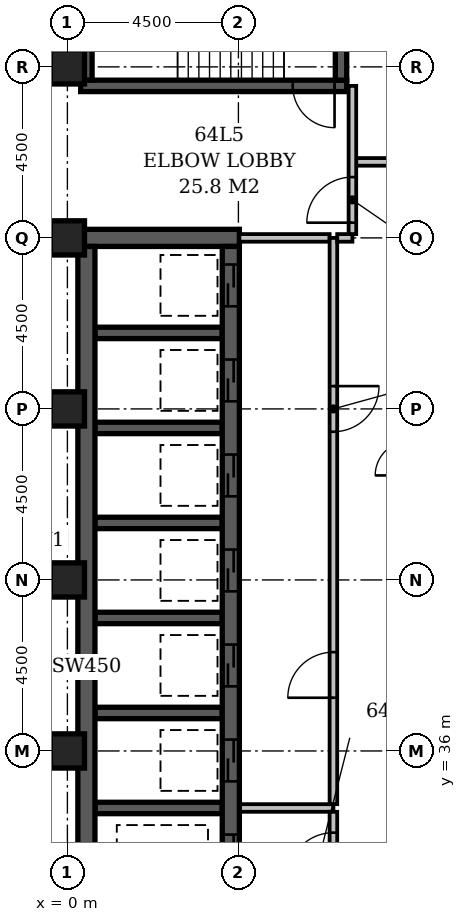
"""IFC4 building model, lengths in metres.
Left out: names, types, materials, properties, quantities, classifications, styles, units other than length and angle.
Written with IfcOpenShell. Run it as: python <this file> out.ifc"""

import sys

from ifc_helpers import new_model, si_unit, direction, frame, frame_2d, origin, origin_2d, place, context, subcontext, project, spatial, rectangle, extrude, element, fill, save


model = new_model("IFC4")
c1 = context("Model", 3, precision=1e-05, world=origin(), true_north=direction((0.0, 1.0)))
c2 = subcontext(c1, "Body", "Model", "MODEL_VIEW")
j1 = project(units=[si_unit("LENGTHUNIT", "METRE"), si_unit("PLANEANGLEUNIT", "RADIAN")], contexts=[c1])
p1 = place(None, origin())
s1 = spatial("IfcSite", under=j1, at=p1, CompositionType="ELEMENT")
p2 = place(p1, origin())
s2 = spatial("IfcBuilding", under=s1, at=p2, CompositionType="ELEMENT")
p3 = place(p2, frame((0.0, 0.0, 247.4)))
s3 = spatial("IfcBuildingStorey", under=s2, at=p3, CompositionType="ELEMENT", Elevation=247.4)
p4 = place(p3, frame((0.275, 49.5, -0.3), z_axis=(0.0, 0.0, 1.0), x_axis=(1.0, 0.0, 0.0)))
e1 = element("IfcWall", 1, at=p4, inside=s3, PredefinedType="SHEAR", context=c2, shape_type="SweptSolid", body=[
    extrude(rectangle(XDim=4.25, YDim=0.45, at=frame_2d((2.125, 0.0))), origin(), (0.0, 0.0, 1.0), 3.6),
])
p5 = place(p3, frame((0.35, 53.5, -0.3), z_axis=(0.0, 0.0, 1.0), x_axis=(1.0, 0.0, 0.0)))
e2 = element("IfcWall", 2, at=p5, inside=s3, PredefinedType="SHEAR", context=c2, shape_type="SweptSolid", body=[
    extrude(rectangle(XDim=7.0, YDim=0.3, at=frame_2d((3.5, 0.0))), origin(), (0.0, 0.0, 1.0), 3.6),
])
p6 = place(p5, frame((5.58, 0.0, 0.3)))
e3 = element("IfcOpeningElement", 3, at=p6, cuts=e2, PredefinedType="OPENING", context=c2, shape_type="SweptSolid", body=[
    extrude(rectangle(XDim=1.1, YDim=2.1, at=frame_2d((0.55, 1.05))), frame((0.0, 0.162, 0.0), z_axis=(0.0, -1.0, 0.0), x_axis=(1.0, 0.0, 0.0)), (0.0, 0.0, 1.0), 0.324),
])
p7 = place(p3, frame((0.5, 27.15, -0.3), z_axis=(0.0, 0.0, 1.0), x_axis=(0.0, 1.0, 0.0)))
e4 = element("IfcWall", 4, at=p7, inside=s3, PredefinedType="SHEAR", context=c2, shape_type="SweptSolid", body=[
    extrude(rectangle(XDim=22.125, YDim=0.45, at=frame_2d((11.062, 0.0))), origin(), (0.0, 0.0, 1.0), 3.6),
])
p8 = place(p3, frame((0.5, 53.65, -0.3), z_axis=(0.0, 0.0, 1.0), x_axis=(0.0, 1.0, 0.0)))
e5 = element("IfcWall", 5, at=p8, inside=s3, PredefinedType="SHEAR", context=c2, shape_type="SweptSolid", body=[
    extrude(rectangle(XDim=4.2, YDim=0.3, at=frame_2d((2.1, 0.0))), origin(), (0.0, 0.0, 1.0), 3.6),
])
for number, where, z_axis, x_axis in (
    (6, (0.725, 34.5, -0.3), (0.0, 0.0, 1.0), (1.0, 0.0, 0.0)),
    (7, (0.725, 37.0, -0.3), (0.0, 0.0, 1.0), (1.0, 0.0, 0.0)),
    (8, (0.725, 39.5, -0.3), (0.0, 0.0, 1.0), (1.0, 0.0, 0.0)),
    (9, (0.725, 42.0, -0.3), (0.0, 0.0, 1.0), (1.0, 0.0, 0.0)),
    (10, (0.725, 44.5, -0.3), (0.0, 0.0, 1.0), (1.0, 0.0, 0.0)),
    (11, (0.725, 47.0, -0.3), (0.0, 0.0, 1.0), (1.0, 0.0, 0.0)),
):
    element("IfcWall", number, at=place(p3, frame(where, z_axis=z_axis, x_axis=x_axis)), inside=s3, PredefinedType="SHEAR", context=c2, shape_type="SweptSolid", body=[
        extrude(rectangle(XDim=3.35, YDim=0.3, at=frame_2d((1.675, 0.0))), origin(), (0.0, 0.0, 1.0), 3.6),
    ])
p9 = place(p3, frame((4.3, 27.15, -0.3), z_axis=(0.0, 0.0, 1.0), x_axis=(0.0, 1.0, 0.0)))
e12 = element("IfcWall", 12, at=p9, inside=s3, PredefinedType="SHEAR", context=c2, shape_type="SweptSolid", body=[
    extrude(rectangle(XDim=22.125, YDim=0.45, at=frame_2d((11.062, 0.0))), origin(), (0.0, 0.0, 1.0), 3.6),
])
p10 = place(p9, frame((3.05, 0.0, 0.3)))
e13 = element("IfcOpeningElement", 13, at=p10, cuts=e12, PredefinedType="OPENING", context=c2, shape_type="SweptSolid", body=[
    extrude(rectangle(XDim=1.1, YDim=2.1, at=frame_2d((0.55, 1.05))), frame((0.0, 0.237, 0.0), z_axis=(0.0, -1.0, 0.0), x_axis=(1.0, 0.0, 0.0)), (0.0, 0.0, 1.0), 0.474),
])
p11 = place(p9, frame((0.55, 0.0, 0.3)))
e14 = element("IfcOpeningElement", 14, at=p11, cuts=e12, PredefinedType="OPENING", context=c2, shape_type="SweptSolid", body=[
    extrude(rectangle(XDim=1.1, YDim=2.1, at=frame_2d((0.55, 1.05))), frame((0.0, 0.237, 0.0), z_axis=(0.0, -1.0, 0.0), x_axis=(1.0, 0.0, 0.0)), (0.0, 0.0, 1.0), 0.474),
])
p12 = place(p9, frame((20.55, 0.0, 0.3)))
e15 = element("IfcOpeningElement", 15, at=p12, cuts=e12, PredefinedType="OPENING", context=c2, shape_type="SweptSolid", body=[
    extrude(rectangle(XDim=1.1, YDim=2.1, at=frame_2d((0.55, 1.05))), frame((0.0, 0.237, 0.0), z_axis=(0.0, -1.0, 0.0), x_axis=(1.0, 0.0, 0.0)), (0.0, 0.0, 1.0), 0.474),
])
p13 = place(p9, frame((18.05, 0.0, 0.3)))
e16 = element("IfcOpeningElement", 16, at=p13, cuts=e12, PredefinedType="OPENING", context=c2, shape_type="SweptSolid", body=[
    extrude(rectangle(XDim=1.1, YDim=2.1, at=frame_2d((0.55, 1.05))), frame((0.0, 0.237, 0.0), z_axis=(0.0, -1.0, 0.0), x_axis=(1.0, 0.0, 0.0)), (0.0, 0.0, 1.0), 0.474),
])
p14 = place(p9, frame((15.55, 0.0, 0.3)))
e17 = element("IfcOpeningElement", 17, at=p14, cuts=e12, PredefinedType="OPENING", context=c2, shape_type="SweptSolid", body=[
    extrude(rectangle(XDim=1.1, YDim=2.1, at=frame_2d((0.55, 1.05))), frame((0.0, 0.237, 0.0), z_axis=(0.0, -1.0, 0.0), x_axis=(1.0, 0.0, 0.0)), (0.0, 0.0, 1.0), 0.474),
])
p15 = place(p9, frame((13.05, 0.0, 0.3)))
e18 = element("IfcOpeningElement", 18, at=p15, cuts=e12, PredefinedType="OPENING", context=c2, shape_type="SweptSolid", body=[
    extrude(rectangle(XDim=1.1, YDim=2.1, at=frame_2d((0.55, 1.05))), frame((0.0, 0.237, 0.0), z_axis=(0.0, -1.0, 0.0), x_axis=(1.0, 0.0, 0.0)), (0.0, 0.0, 1.0), 0.474),
])
p16 = place(p9, frame((10.55, 0.0, 0.3)))
e19 = element("IfcOpeningElement", 19, at=p16, cuts=e12, PredefinedType="OPENING", context=c2, shape_type="SweptSolid", body=[
    extrude(rectangle(XDim=1.1, YDim=2.1, at=frame_2d((0.55, 1.05))), frame((0.0, 0.237, 0.0), z_axis=(0.0, -1.0, 0.0), x_axis=(1.0, 0.0, 0.0)), (0.0, 0.0, 1.0), 0.474),
])
p17 = place(p9, frame((8.05, 0.0, 0.3)))
e20 = element("IfcOpeningElement", 20, at=p17, cuts=e12, PredefinedType="OPENING", context=c2, shape_type="SweptSolid", body=[
    extrude(rectangle(XDim=1.1, YDim=2.1, at=frame_2d((0.55, 1.05))), frame((0.0, 0.237, 0.0), z_axis=(0.0, -1.0, 0.0), x_axis=(1.0, 0.0, 0.0)), (0.0, 0.0, 1.0), 0.474),
])
p18 = place(p9, frame((5.55, 0.0, 0.3)))
e21 = element("IfcOpeningElement", 21, at=p18, cuts=e12, PredefinedType="OPENING", context=c2, shape_type="SweptSolid", body=[
    extrude(rectangle(XDim=1.1, YDim=2.1, at=frame_2d((0.55, 1.05))), frame((0.0, 0.237, 0.0), z_axis=(0.0, -1.0, 0.0), x_axis=(1.0, 0.0, 0.0)), (0.0, 0.0, 1.0), 0.474),
])
p19 = place(p3, frame((7.2, 53.65, -0.3), z_axis=(0.0, 0.0, 1.0), x_axis=(0.0, 1.0, 0.0)))
e22 = element("IfcWall", 22, at=p19, inside=s3, PredefinedType="SHEAR", context=c2, shape_type="SweptSolid", body=[
    extrude(rectangle(XDim=4.2, YDim=0.3, at=frame_2d((2.1, 0.0))), origin(), (0.0, 0.0, 1.0), 3.6),
])
for number, where, z_axis, x_axis in (
    (23, (0.0, 36.0, -0.3), (0.0, 0.0, 1.0), (1.0, 0.0, 0.0)),
    (24, (0.0, 40.5, -0.3), (0.0, 0.0, 1.0), (1.0, 0.0, 0.0)),
    (25, (0.0, 45.0, -0.3), (0.0, 0.0, 1.0), (1.0, 0.0, 0.0)),
    (26, (0.0, 49.5, -0.3), (0.0, 0.0, 1.0), (1.0, 0.0, 0.0)),
    (27, (0.0, 54.0, -0.3), (0.0, 0.0, 1.0), (1.0, 0.0, 0.0)),
):
    element("IfcColumn", number, at=place(p3, frame(where, z_axis=z_axis, x_axis=x_axis)), inside=s3, PredefinedType="COLUMN", context=c2, shape_type="SweptSolid", body=[
        extrude(rectangle(XDim=0.9, YDim=0.9, at=origin_2d()), origin(), (0.0, 0.0, 1.0), 3.6),
    ])
p20 = place(p3, frame((4.545, 34.5, 0.0), z_axis=(0.0, 0.0, 1.0), x_axis=(1.0, 0.0, 0.0)))
e28 = element("IfcWall", 28, at=p20, inside=s3, PredefinedType="PARTITIONING", context=c2, shape_type="SweptSolid", body=[
    extrude(rectangle(XDim=2.455, YDim=0.2, at=frame_2d((1.228, 0.0))), origin(), (0.0, 0.0, 1.0), 3.3),
])
p21 = place(p3, frame((7.0, 34.6, 0.0), z_axis=(0.0, 0.0, 1.0), x_axis=(0.0, 1.0, 0.0)))
e29 = element("IfcWall", 29, at=p21, inside=s3, PredefinedType="PARTITIONING", context=c2, shape_type="SweptSolid", body=[
    extrude(rectangle(XDim=14.9, YDim=0.2, at=frame_2d((7.45, 0.0))), origin(), (0.0, 0.0, 1.0), 3.3),
])
p22 = place(p21, frame((2.8, 0.0, 0.0)))
e30 = element("IfcOpeningElement", 30, at=p22, cuts=e29, PredefinedType="OPENING", context=c2, shape_type="SweptSolid", body=[
    extrude(rectangle(XDim=1.2, YDim=2.1, at=frame_2d((0.6, 1.05))), frame((0.0, 0.112, 0.0), z_axis=(0.0, -1.0, 0.0), x_axis=(1.0, 0.0, 0.0)), (0.0, 0.0, 1.0), 0.224),
])
p23 = place(p21, frame((9.8, 0.0, 0.0)))
e31 = element("IfcOpeningElement", 31, at=p23, cuts=e29, PredefinedType="OPENING", context=c2, shape_type="SweptSolid", body=[
    extrude(rectangle(XDim=1.2, YDim=2.1, at=frame_2d((0.6, 1.05))), frame((0.0, 0.112, 0.0), z_axis=(0.0, -1.0, 0.0), x_axis=(1.0, 0.0, 0.0)), (0.0, 0.0, 1.0), 0.224),
])
p24 = place(p3, frame((4.525, 49.5, 0.0), z_axis=(0.0, 0.0, 1.0), x_axis=(1.0, 0.0, 0.0)))
e32 = element("IfcWall", 32, at=p24, inside=s3, PredefinedType="PARTITIONING", context=c2, shape_type="SweptSolid", body=[
    extrude(rectangle(XDim=2.375, YDim=0.2, at=frame_2d((1.188, 0.0))), origin(), (0.0, 0.0, 1.0), 3.3),
])
p25 = place(p3, frame((7.0, 32.1, 0.0), z_axis=(0.0, 0.0, 1.0), x_axis=(0.0, 1.0, 0.0)))
e33 = element("IfcWall", 33, at=p25, inside=s3, PredefinedType="PARTITIONING", context=c2, shape_type="SweptSolid", body=[
    extrude(rectangle(XDim=2.3, YDim=0.2, at=frame_2d((1.15, 0.0))), origin(), (0.0, 0.0, 1.0), 3.3),
])
p26 = place(p25, frame((0.55, 0.0, 0.0)))
e34 = element("IfcOpeningElement", 34, at=p26, cuts=e33, PredefinedType="OPENING", context=c2, shape_type="SweptSolid", body=[
    extrude(rectangle(XDim=1.2, YDim=2.1, at=frame_2d((0.6, 1.05))), frame((0.0, 0.112, 0.0), z_axis=(0.0, -1.0, 0.0), x_axis=(1.0, 0.0, 0.0)), (0.0, 0.0, 1.0), 0.224),
])
p27 = place(p3, frame((7.1, 49.5, 0.0), z_axis=(0.0, 0.0, 1.0), x_axis=(1.0, 0.0, 0.0)))
e35 = element("IfcWall", 35, at=p27, inside=s3, PredefinedType="PARTITIONING", context=c2, shape_type="SweptSolid", body=[
    extrude(rectangle(XDim=0.4, YDim=0.2, at=frame_2d((0.2, 0.0))), origin(), (0.0, 0.0, 1.0), 3.3),
])
p28 = place(p3, frame((7.5, 49.6, 0.0), z_axis=(0.0, 0.0, 1.0), x_axis=(0.0, 1.0, 0.0)))
e36 = element("IfcWall", 36, at=p28, inside=s3, PredefinedType="PARTITIONING", context=c2, shape_type="SweptSolid", body=[
    extrude(rectangle(XDim=3.9, YDim=0.2, at=frame_2d((1.95, 0.0))), origin(), (0.0, 0.0, 1.0), 3.3),
])
p29 = place(p28, frame((0.3, 0.0, 0.0)))
e37 = element("IfcOpeningElement", 37, at=p29, cuts=e36, PredefinedType="OPENING", context=c2, shape_type="SweptSolid", body=[
    extrude(rectangle(XDim=1.2, YDim=2.1, at=frame_2d((0.6, 1.05))), frame((0.0, 0.112, 0.0), z_axis=(0.0, -1.0, 0.0), x_axis=(1.0, 0.0, 0.0)), (0.0, 0.0, 1.0), 0.224),
])
p30 = place(p3, frame((7.6, 51.5, 0.0), z_axis=(0.0, 0.0, 1.0), x_axis=(1.0, 0.0, 0.0)))
e38 = element("IfcWall", 38, at=p30, inside=s3, PredefinedType="PARTITIONING", context=c2, shape_type="SweptSolid", body=[
    extrude(rectangle(XDim=14.65, YDim=0.2, at=frame_2d((7.325, 0.0))), origin(), (0.0, 0.0, 1.0), 3.3),
])
p31 = place(p30, frame((3.4, 0.0, 0.0)))
e39 = element("IfcOpeningElement", 39, at=p31, cuts=e38, PredefinedType="OPENING", context=c2, shape_type="SweptSolid", body=[
    extrude(rectangle(XDim=1.2, YDim=2.1, at=frame_2d((0.6, 1.05))), frame((0.0, 0.112, 0.0), z_axis=(0.0, -1.0, 0.0), x_axis=(1.0, 0.0, 0.0)), (0.0, 0.0, 1.0), 0.224),
])
p32 = place(p30, frame((10.925, 0.0, 0.0)))
e40 = element("IfcOpeningElement", 40, at=p32, cuts=e38, PredefinedType="OPENING", context=c2, shape_type="SweptSolid", body=[
    extrude(rectangle(XDim=1.0, YDim=2.1, at=frame_2d((0.5, 1.05))), frame((0.0, 0.112, 0.0), z_axis=(0.0, -1.0, 0.0), x_axis=(1.0, 0.0, 0.0)), (0.0, 0.0, 1.0), 0.224),
])
p33 = place(p29, origin())
e41 = element("IfcDoor", 41, at=p33, inside=s3, OperationType="SINGLE_SWING_LEFT", PredefinedType="DOOR", context=c2, shape_type="SweptSolid", body=[
    extrude(rectangle(XDim=1.2, YDim=2.1, at=frame_2d((0.6, 1.05))), frame((0.0, 0.025, 0.0), z_axis=(0.0, -1.0, 0.0), x_axis=(1.0, 0.0, 0.0)), (0.0, 0.0, 1.0), 0.05),
])
fill(e37, e41)
p34 = place(p12, origin())
e42 = element("IfcDoor", 42, at=p34, inside=s3, OperationType="SLIDING_TO_LEFT", PredefinedType="DOOR", context=c2, shape_type="SweptSolid", body=[
    extrude(rectangle(XDim=1.1, YDim=2.1, at=frame_2d((0.55, 1.05))), frame((0.0, 0.025, 0.0), z_axis=(0.0, -1.0, 0.0), x_axis=(1.0, 0.0, 0.0)), (0.0, 0.0, 1.0), 0.05),
])
fill(e15, e42)
p35 = place(p13, origin())
e43 = element("IfcDoor", 43, at=p35, inside=s3, OperationType="SLIDING_TO_LEFT", PredefinedType="DOOR", context=c2, shape_type="SweptSolid", body=[
    extrude(rectangle(XDim=1.1, YDim=2.1, at=frame_2d((0.55, 1.05))), frame((0.0, 0.025, 0.0), z_axis=(0.0, -1.0, 0.0), x_axis=(1.0, 0.0, 0.0)), (0.0, 0.0, 1.0), 0.05),
])
fill(e16, e43)
p36 = place(p14, origin())
e44 = element("IfcDoor", 44, at=p36, inside=s3, OperationType="SLIDING_TO_LEFT", PredefinedType="DOOR", context=c2, shape_type="SweptSolid", body=[
    extrude(rectangle(XDim=1.1, YDim=2.1, at=frame_2d((0.55, 1.05))), frame((0.0, 0.025, 0.0), z_axis=(0.0, -1.0, 0.0), x_axis=(1.0, 0.0, 0.0)), (0.0, 0.0, 1.0), 0.05),
])
fill(e17, e44)
p37 = place(p15, origin())
e45 = element("IfcDoor", 45, at=p37, inside=s3, OperationType="SLIDING_TO_LEFT", PredefinedType="DOOR", context=c2, shape_type="SweptSolid", body=[
    extrude(rectangle(XDim=1.1, YDim=2.1, at=frame_2d((0.55, 1.05))), frame((0.0, 0.025, 0.0), z_axis=(0.0, -1.0, 0.0), x_axis=(1.0, 0.0, 0.0)), (0.0, 0.0, 1.0), 0.05),
])
fill(e18, e45)
p38 = place(p16, origin())
e46 = element("IfcDoor", 46, at=p38, inside=s3, OperationType="SLIDING_TO_LEFT", PredefinedType="DOOR", context=c2, shape_type="SweptSolid", body=[
    extrude(rectangle(XDim=1.1, YDim=2.1, at=frame_2d((0.55, 1.05))), frame((0.0, 0.025, 0.0), z_axis=(0.0, -1.0, 0.0), x_axis=(1.0, 0.0, 0.0)), (0.0, 0.0, 1.0), 0.05),
])
fill(e19, e46)
p39 = place(p17, origin())
e47 = element("IfcDoor", 47, at=p39, inside=s3, OperationType="SLIDING_TO_LEFT", PredefinedType="DOOR", context=c2, shape_type="SweptSolid", body=[
    extrude(rectangle(XDim=1.1, YDim=2.1, at=frame_2d((0.55, 1.05))), frame((0.0, 0.025, 0.0), z_axis=(0.0, -1.0, 0.0), x_axis=(1.0, 0.0, 0.0)), (0.0, 0.0, 1.0), 0.05),
])
fill(e20, e47)
p40 = place(p22, origin())
e48 = element("IfcDoor", 48, at=p40, inside=s3, OperationType="SINGLE_SWING_LEFT", PredefinedType="DOOR", context=c2, shape_type="SweptSolid", body=[
    extrude(rectangle(XDim=1.2, YDim=2.1, at=frame_2d((0.6, 1.05))), frame((0.0, 0.025, 0.0), z_axis=(0.0, -1.0, 0.0), x_axis=(1.0, 0.0, 0.0)), (0.0, 0.0, 1.0), 0.05),
])
fill(e30, e48)
p41 = place(p23, origin())
e49 = element("IfcDoor", 49, at=p41, inside=s3, OperationType="SINGLE_SWING_RIGHT", PredefinedType="DOOR", context=c2, shape_type="SweptSolid", body=[
    extrude(rectangle(XDim=1.2, YDim=2.1, at=frame_2d((0.6, 1.05))), frame((0.0, 0.025, 0.0), z_axis=(0.0, -1.0, 0.0), x_axis=(1.0, 0.0, 0.0)), (0.0, 0.0, 1.0), 0.05),
])
fill(e31, e49)
p42 = place(p26, origin())
e50 = element("IfcDoor", 50, at=p42, inside=s3, OperationType="SINGLE_SWING_LEFT", PredefinedType="DOOR", context=c2, shape_type="SweptSolid", body=[
    extrude(rectangle(XDim=1.2, YDim=2.1, at=frame_2d((0.6, 1.05))), frame((0.0, 0.025, 0.0), z_axis=(0.0, -1.0, 0.0), x_axis=(1.0, 0.0, 0.0)), (0.0, 0.0, 1.0), 0.05),
])
fill(e34, e50)
p43 = place(p18, origin())
e51 = element("IfcDoor", 51, at=p43, inside=s3, OperationType="SLIDING_TO_LEFT", PredefinedType="DOOR", context=c2, shape_type="SweptSolid", body=[
    extrude(rectangle(XDim=1.1, YDim=2.1, at=frame_2d((0.55, 1.05))), frame((0.0, 0.025, 0.0), z_axis=(0.0, -1.0, 0.0), x_axis=(1.0, 0.0, 0.0)), (0.0, 0.0, 1.0), 0.05),
])
fill(e21, e51)
p44 = place(p6, origin())
e52 = element("IfcDoor", 52, at=p44, inside=s3, OperationType="SINGLE_SWING_RIGHT", PredefinedType="DOOR", context=c2, shape_type="SweptSolid", body=[
    extrude(rectangle(XDim=1.1, YDim=2.1, at=frame_2d((0.55, 1.05))), frame((0.0, 0.025, 0.0), z_axis=(0.0, -1.0, 0.0), x_axis=(1.0, 0.0, 0.0)), (0.0, 0.0, 1.0), 0.05),
])
fill(e3, e52)
save(model, sys.argv[1])
